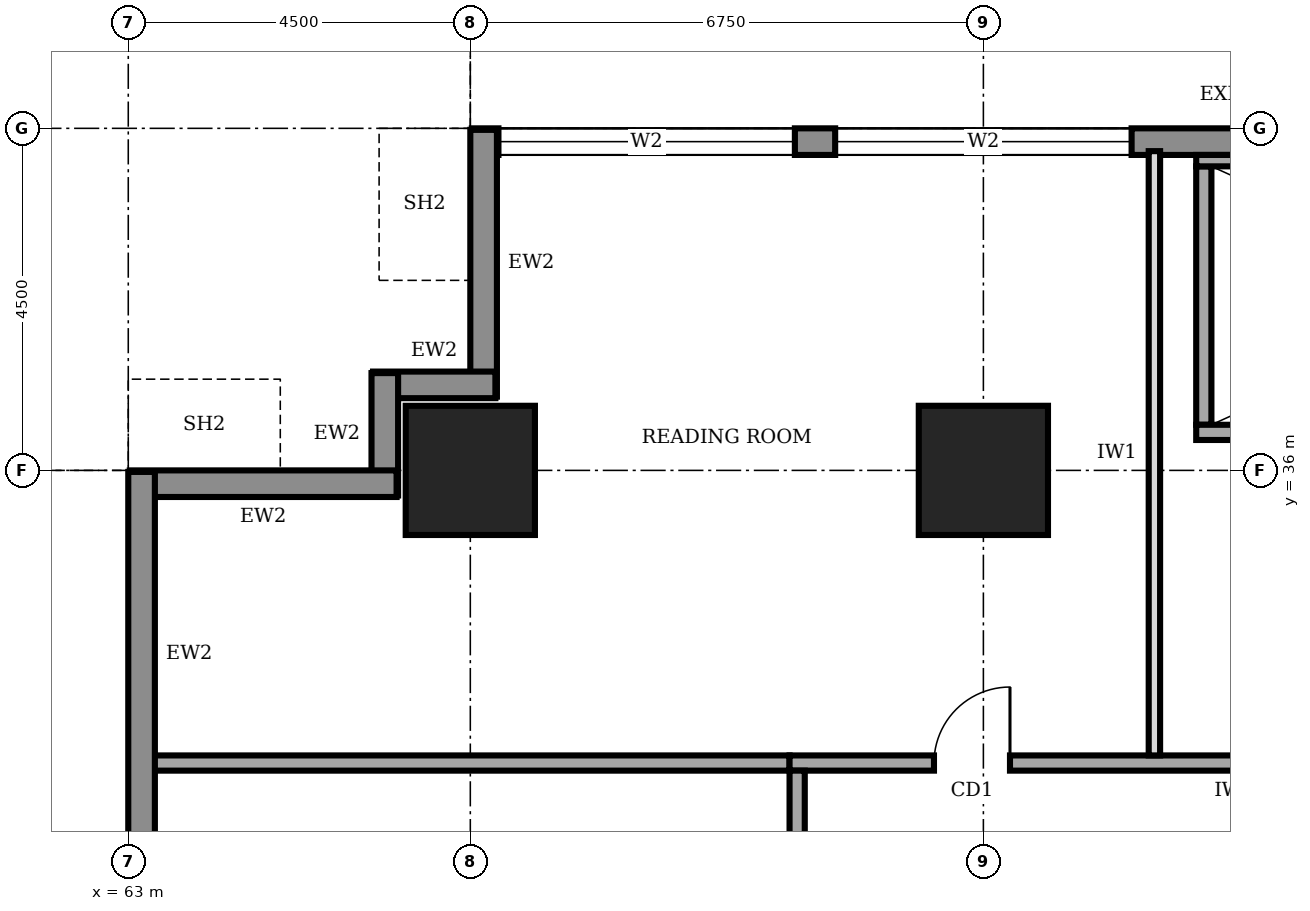
"""IFC4 building model, lengths in metres.
Left out: names, types, materials, properties, quantities, classifications, styles, units other than length and angle.
Written with IfcOpenShell. Run it as: python <this file> out.ifc"""

import sys

from ifc_helpers import new_model, si_unit, direction, frame, frame_2d, origin, origin_2d, place, context, subcontext, project, spatial, rectangle, extrude, element, fill, save


model = new_model("IFC4")
c1 = context("Model", 3, precision=1e-05, world=origin(), true_north=direction((0.0, 1.0)))
c2 = subcontext(c1, "Body", "Model", "MODEL_VIEW")
j1 = project(units=[si_unit("LENGTHUNIT", "METRE"), si_unit("PLANEANGLEUNIT", "RADIAN")], contexts=[c1])
p1 = place(None, origin())
s1 = spatial("IfcSite", under=j1, at=p1, CompositionType="ELEMENT")
p2 = place(p1, origin())
s2 = spatial("IfcBuilding", under=s1, at=p2, CompositionType="ELEMENT")
p3 = place(p2, frame((0.0, 0.0, 57.0)))
s3 = spatial("IfcBuildingStorey", under=s2, at=p3, CompositionType="ELEMENT", Elevation=57.0)
for number, where, z_axis, x_axis in (
    (1, (67.5, 36.0, 0.0), (0.0, 0.0, 1.0), (1.0, 0.0, 0.0)),
    (2, (74.25, 36.0, 0.0), (0.0, 0.0, 1.0), (1.0, 0.0, 0.0)),
):
    element("IfcColumn", number, at=place(p3, frame(where, z_axis=z_axis, x_axis=x_axis)), inside=s3, PredefinedType="COLUMN", context=c2, shape_type="SweptSolid", body=[
        extrude(rectangle(XDim=1.7, YDim=1.7, at=origin_2d()), origin(), (0.0, 0.0, 1.0), 4.0),
    ])
p4 = place(p3, frame((94.48, 40.325, 0.0), z_axis=(0.0, 0.0, 1.0), x_axis=(-1.0, 0.0, 0.0)))
e3 = element("IfcWall", 3, at=p4, inside=s3, PredefinedType="STANDARD", context=c2, shape_type="SweptSolid", body=[
    extrude(rectangle(XDim=26.96, YDim=0.35, at=frame_2d((13.48, 0.0))), origin(), (0.0, 0.0, 1.0), 3.75),
])
p5 = place(p4, frame((22.71, 0.0, 0.6)))
e4 = element("IfcOpeningElement", 4, at=p5, cuts=e3, PredefinedType="OPENING", context=c2, shape_type="SweptSolid", body=[
    extrude(rectangle(XDim=3.9, YDim=2.6, at=frame_2d((1.95, 1.3))), frame((0.0, 0.185, 0.0), z_axis=(0.0, -1.0, 0.0), x_axis=(1.0, 0.0, 0.0)), (0.0, 0.0, 1.0), 0.37),
])
p6 = place(p4, frame((18.28, 0.0, 0.6)))
e5 = element("IfcOpeningElement", 5, at=p6, cuts=e3, PredefinedType="OPENING", context=c2, shape_type="SweptSolid", body=[
    extrude(rectangle(XDim=3.9, YDim=2.6, at=frame_2d((1.95, 1.3))), frame((0.0, 0.185, 0.0), z_axis=(0.0, -1.0, 0.0), x_axis=(1.0, 0.0, 0.0)), (0.0, 0.0, 1.0), 0.37),
])
p7 = place(p4, frame((4.78, 0.0, 0.6)))
e6 = element("IfcOpeningElement", 6, at=p7, cuts=e3, PredefinedType="OPENING", context=c2, shape_type="SweptSolid", body=[
    extrude(rectangle(XDim=3.9, YDim=2.6, at=frame_2d((1.95, 1.3))), frame((0.0, 0.185, 0.0), z_axis=(0.0, -1.0, 0.0), x_axis=(1.0, 0.0, 0.0)), (0.0, 0.0, 1.0), 0.37),
])
p8 = place(p3, frame((67.675, 40.48, 0.0), z_axis=(0.0, 0.0, 1.0), x_axis=(0.0, -1.0, 0.0)))
e7 = element("IfcWall", 7, at=p8, inside=s3, PredefinedType="STANDARD", context=c2, shape_type="SweptSolid", body=[
    extrude(rectangle(XDim=3.51, YDim=0.35, at=frame_2d((1.755, 0.0))), origin(), (0.0, 0.0, 1.0), 2.85),
])
for number, where, z_axis, x_axis in (
    (8, (67.83, 37.125, 0.0), (0.0, 0.0, 1.0), (-1.0, 0.0, 0.0)),
    (9, (66.375, 37.28, 0.0), (0.0, 0.0, 1.0), (0.0, -1.0, 0.0)),
):
    element("IfcWall", number, at=place(p3, frame(where, z_axis=z_axis, x_axis=x_axis)), inside=s3, PredefinedType="STANDARD", context=c2, shape_type="SweptSolid", body=[
        extrude(rectangle(XDim=1.61, YDim=0.35, at=frame_2d((0.805, 0.0))), origin(), (0.0, 0.0, 1.0), 3.75),
    ])
p9 = place(p3, frame((66.53, 35.825, 0.0), z_axis=(0.0, 0.0, 1.0), x_axis=(-1.0, 0.0, 0.0)))
e10 = element("IfcWall", 10, at=p9, inside=s3, PredefinedType="STANDARD", context=c2, shape_type="SweptSolid", body=[
    extrude(rectangle(XDim=3.51, YDim=0.35, at=frame_2d((1.755, 0.0))), origin(), (0.0, 0.0, 1.0), 2.85),
])
p10 = place(p3, frame((63.175, 35.98, 0.0), z_axis=(0.0, 0.0, 1.0), x_axis=(0.0, -1.0, 0.0)))
e11 = element("IfcWall", 11, at=p10, inside=s3, PredefinedType="STANDARD", context=c2, shape_type="SweptSolid", body=[
    extrude(rectangle(XDim=31.46, YDim=0.35, at=frame_2d((15.73, 0.0))), origin(), (0.0, 0.0, 1.0), 3.75),
])
p11 = place(p10, frame((27.21, 0.0, 0.6)))
e12 = element("IfcOpeningElement", 12, at=p11, cuts=e11, PredefinedType="OPENING", context=c2, shape_type="SweptSolid", body=[
    extrude(rectangle(XDim=3.9, YDim=2.6, at=frame_2d((1.95, 1.3))), frame((0.0, 0.185, 0.0), z_axis=(0.0, -1.0, 0.0), x_axis=(1.0, 0.0, 0.0)), (0.0, 0.0, 1.0), 0.37),
])
p12 = place(p10, frame((22.78, 0.0, 0.6)))
e13 = element("IfcOpeningElement", 13, at=p12, cuts=e11, PredefinedType="OPENING", context=c2, shape_type="SweptSolid", body=[
    extrude(rectangle(XDim=3.9, YDim=2.6, at=frame_2d((1.95, 1.3))), frame((0.0, 0.185, 0.0), z_axis=(0.0, -1.0, 0.0), x_axis=(1.0, 0.0, 0.0)), (0.0, 0.0, 1.0), 0.37),
])
p13 = place(p10, frame((18.28, 0.0, 0.6)))
e14 = element("IfcOpeningElement", 14, at=p13, cuts=e11, PredefinedType="OPENING", context=c2, shape_type="SweptSolid", body=[
    extrude(rectangle(XDim=3.9, YDim=2.6, at=frame_2d((1.95, 1.3))), frame((0.0, 0.185, 0.0), z_axis=(0.0, -1.0, 0.0), x_axis=(1.0, 0.0, 0.0)), (0.0, 0.0, 1.0), 0.37),
])
p14 = place(p10, frame((13.78, 0.0, 0.6)))
e15 = element("IfcOpeningElement", 15, at=p14, cuts=e11, PredefinedType="OPENING", context=c2, shape_type="SweptSolid", body=[
    extrude(rectangle(XDim=3.9, YDim=2.6, at=frame_2d((1.95, 1.3))), frame((0.0, 0.185, 0.0), z_axis=(0.0, -1.0, 0.0), x_axis=(1.0, 0.0, 0.0)), (0.0, 0.0, 1.0), 0.37),
])
p15 = place(p10, frame((9.28, 0.0, 0.6)))
e16 = element("IfcOpeningElement", 16, at=p15, cuts=e11, PredefinedType="OPENING", context=c2, shape_type="SweptSolid", body=[
    extrude(rectangle(XDim=3.9, YDim=2.6, at=frame_2d((1.95, 1.3))), frame((0.0, 0.185, 0.0), z_axis=(0.0, -1.0, 0.0), x_axis=(1.0, 0.0, 0.0)), (0.0, 0.0, 1.0), 0.37),
])
p16 = place(p10, frame((4.78, 0.0, 0.6)))
e17 = element("IfcOpeningElement", 17, at=p16, cuts=e11, PredefinedType="OPENING", context=c2, shape_type="SweptSolid", body=[
    extrude(rectangle(XDim=3.9, YDim=2.6, at=frame_2d((1.95, 1.3))), frame((0.0, 0.185, 0.0), z_axis=(0.0, -1.0, 0.0), x_axis=(1.0, 0.0, 0.0)), (0.0, 0.0, 1.0), 0.37),
])
p17 = place(p3, frame((89.35, 32.15, 0.0), z_axis=(0.0, 0.0, 1.0), x_axis=(-1.0, 0.0, 0.0)))
e18 = element("IfcWall", 18, at=p17, inside=s3, PredefinedType="SOLIDWALL", context=c2, shape_type="SweptSolid", body=[
    extrude(rectangle(XDim=17.65, YDim=0.2, at=frame_2d((8.825, 0.0))), origin(), (0.0, 0.0, 1.0), 3.75),
])
p18 = place(p17, frame((14.75, 0.0, 0.0)))
e19 = element("IfcOpeningElement", 19, at=p18, cuts=e18, PredefinedType="OPENING", context=c2, shape_type="SweptSolid", body=[
    extrude(rectangle(XDim=1.0, YDim=2.1, at=frame_2d((0.5, 1.05))), frame((0.0, 0.11, 0.0), z_axis=(0.0, -1.0, 0.0), x_axis=(1.0, 0.0, 0.0)), (0.0, 0.0, 1.0), 0.22),
])
p19 = place(p17, frame((7.85, 0.0, 0.0)))
e20 = element("IfcOpeningElement", 20, at=p19, cuts=e18, PredefinedType="OPENING", context=c2, shape_type="SweptSolid", body=[
    extrude(rectangle(XDim=1.0, YDim=2.1, at=frame_2d((0.5, 1.05))), frame((0.0, 0.11, 0.0), z_axis=(0.0, -1.0, 0.0), x_axis=(1.0, 0.0, 0.0)), (0.0, 0.0, 1.0), 0.22),
])
p20 = place(p17, frame((1.325, 0.0, 0.0)))
e21 = element("IfcOpeningElement", 21, at=p20, cuts=e18, PredefinedType="OPENING", context=c2, shape_type="SweptSolid", body=[
    extrude(rectangle(XDim=1.0, YDim=2.1, at=frame_2d((0.5, 1.05))), frame((0.0, 0.11, 0.0), z_axis=(0.0, -1.0, 0.0), x_axis=(1.0, 0.0, 0.0)), (0.0, 0.0, 1.0), 0.22),
])
p21 = place(p3, frame((71.8, 32.05, 0.0), z_axis=(0.0, 0.0, 1.0), x_axis=(0.0, -1.0, 0.0)))
e22 = element("IfcWall", 22, at=p21, inside=s3, PredefinedType="SOLIDWALL", context=c2, shape_type="SweptSolid", body=[
    extrude(rectangle(XDim=23.05, YDim=0.2, at=frame_2d((11.525, 0.0))), origin(), (0.0, 0.0, 1.0), 3.75),
])
p22 = place(p21, frame((18.05, 0.0, 0.0)))
e23 = element("IfcOpeningElement", 23, at=p22, cuts=e22, PredefinedType="OPENING", context=c2, shape_type="SweptSolid", body=[
    extrude(rectangle(XDim=1.0, YDim=2.1, at=frame_2d((0.5, 1.05))), frame((0.0, 0.11, 0.0), z_axis=(0.0, -1.0, 0.0), x_axis=(1.0, 0.0, 0.0)), (0.0, 0.0, 1.0), 0.22),
])
p23 = place(p21, frame((11.3, 0.0, 0.0)))
e24 = element("IfcOpeningElement", 24, at=p23, cuts=e22, PredefinedType="OPENING", context=c2, shape_type="SweptSolid", body=[
    extrude(rectangle(XDim=1.0, YDim=2.1, at=frame_2d((0.5, 1.05))), frame((0.0, 0.11, 0.0), z_axis=(0.0, -1.0, 0.0), x_axis=(1.0, 0.0, 0.0)), (0.0, 0.0, 1.0), 0.22),
])
p24 = place(p21, frame((4.175, 0.0, 0.0)))
e25 = element("IfcOpeningElement", 25, at=p24, cuts=e22, PredefinedType="OPENING", context=c2, shape_type="SweptSolid", body=[
    extrude(rectangle(XDim=1.0, YDim=2.1, at=frame_2d((0.5, 1.05))), frame((0.0, 0.11, 0.0), z_axis=(0.0, -1.0, 0.0), x_axis=(1.0, 0.0, 0.0)), (0.0, 0.0, 1.0), 0.22),
])
p25 = place(p3, frame((63.3, 32.15, 0.0), z_axis=(0.0, 0.0, 1.0), x_axis=(1.0, 0.0, 0.0)))
e26 = element("IfcWall", 26, at=p25, inside=s3, PredefinedType="SOLIDWALL", context=c2, shape_type="SweptSolid", body=[
    extrude(rectangle(XDim=8.4, YDim=0.2, at=frame_2d((4.2, 0.0))), origin(), (0.0, 0.0, 1.0), 3.75),
])
p26 = place(p3, frame((76.5, 32.25, 0.0), z_axis=(0.0, 0.0, 1.0), x_axis=(0.0, 1.0, 0.0)))
e27 = element("IfcWall", 27, at=p26, inside=s3, PredefinedType="PARTITIONING", context=c2, shape_type="SweptSolid", body=[
    extrude(rectangle(XDim=7.95, YDim=0.15, at=frame_2d((3.975, 0.0))), origin(), (0.0, 0.0, 1.0), 3.75),
])
p27 = place(p3, frame((77.05, 36.5, 0.0), z_axis=(0.0, 0.0, 1.0), x_axis=(1.0, 0.0, 0.0)))
e28 = element("IfcWall", 28, at=p27, inside=s3, PredefinedType="SOLIDWALL", context=c2, shape_type="SweptSolid", body=[
    extrude(rectangle(XDim=7.9, YDim=0.2, at=frame_2d((3.95, 0.0))), origin(), (0.0, 0.0, 1.0), 3.75),
])
p28 = place(p27, frame((6.3, 0.0, 0.0)))
e29 = element("IfcOpeningElement", 29, at=p28, cuts=e28, PredefinedType="OPENING", context=c2, shape_type="SweptSolid", body=[
    extrude(rectangle(XDim=1.0, YDim=2.1, at=frame_2d((0.5, 1.05))), frame((0.0, 0.11, 0.0), z_axis=(0.0, -1.0, 0.0), x_axis=(1.0, 0.0, 0.0)), (0.0, 0.0, 1.0), 0.22),
])
p29 = place(p3, frame((77.05, 40.075, 0.0), z_axis=(0.0, 0.0, 1.0), x_axis=(1.0, 0.0, 0.0)))
e30 = element("IfcWall", 30, at=p29, inside=s3, PredefinedType="SOLIDWALL", context=c2, shape_type="SweptSolid", body=[
    extrude(rectangle(XDim=7.9, YDim=0.15, at=frame_2d((3.95, 0.0))), origin(), (0.0, 0.0, 1.0), 3.75),
])
p30 = place(p3, frame((77.15, 36.6, 0.0), z_axis=(0.0, 0.0, 1.0), x_axis=(0.0, 1.0, 0.0)))
e31 = element("IfcWall", 31, at=p30, inside=s3, PredefinedType="SOLIDWALL", context=c2, shape_type="SweptSolid", body=[
    extrude(rectangle(XDim=3.4, YDim=0.2, at=frame_2d((1.7, 0.0))), origin(), (0.0, 0.0, 1.0), 3.75),
])
p31 = place(p5, origin())
e32 = element("IfcWindow", 32, at=p31, inside=s3, PartitioningType="SINGLE_PANEL", PredefinedType="WINDOW", context=c2, shape_type="SweptSolid", body=[
    extrude(rectangle(XDim=3.9, YDim=2.6, at=frame_2d((1.95, 1.3))), frame((0.0, 0.03, 0.0), z_axis=(0.0, -1.0, 0.0), x_axis=(1.0, 0.0, 0.0)), (0.0, 0.0, 1.0), 0.06),
])
fill(e4, e32)
p32 = place(p6, origin())
e33 = element("IfcWindow", 33, at=p32, inside=s3, PartitioningType="SINGLE_PANEL", PredefinedType="WINDOW", context=c2, shape_type="SweptSolid", body=[
    extrude(rectangle(XDim=3.9, YDim=2.6, at=frame_2d((1.95, 1.3))), frame((0.0, 0.03, 0.0), z_axis=(0.0, -1.0, 0.0), x_axis=(1.0, 0.0, 0.0)), (0.0, 0.0, 1.0), 0.06),
])
fill(e5, e33)
p33 = place(p18, frame((1.0, 0.0, 0.0), z_axis=(0.0, 0.0, 1.0), x_axis=(-1.0, 0.0, 0.0)))
e34 = element("IfcDoor", 34, at=p33, inside=s3, OperationType="SINGLE_SWING_RIGHT", PredefinedType="DOOR", context=c2, shape_type="SweptSolid", body=[
    extrude(rectangle(XDim=1.0, YDim=2.1, at=frame_2d((0.5, 1.05))), frame((0.0, 0.025, 0.0), z_axis=(0.0, -1.0, 0.0), x_axis=(1.0, 0.0, 0.0)), (0.0, 0.0, 1.0), 0.05),
])
fill(e19, e34)
save(model, sys.argv[1])
